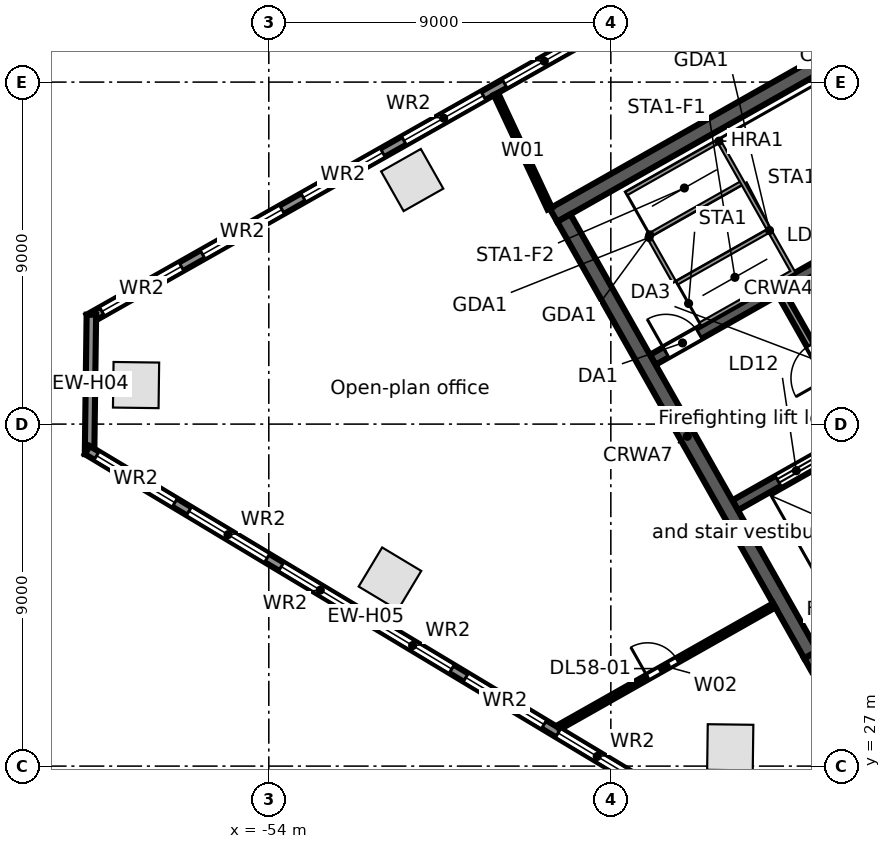
"""IFC4 building model, lengths in metres.
Left out: names, types, materials, properties, quantities, classifications, styles, units other than length and angle.
Written with IfcOpenShell. Run it as: python <this file> out.ifc"""

import sys

from ifc_helpers import new_model, si_unit, direction, frame, frame_2d, origin, origin_2d, place, context, subcontext, project, spatial, rectangle, extrude, element, fill, save


model = new_model("IFC4")
c1 = context("Model", 3, precision=1e-05, world=origin(), true_north=direction((0.0, 1.0)))
c2 = subcontext(c1, "Body", "Model", "MODEL_VIEW")
j1 = project(units=[si_unit("LENGTHUNIT", "METRE"), si_unit("PLANEANGLEUNIT", "RADIAN")], contexts=[c1])
p1 = place(None, origin())
s1 = spatial("IfcSite", under=j1, at=p1, CompositionType="ELEMENT")
p2 = place(p1, origin())
s2 = spatial("IfcBuilding", under=s1, at=p2, CompositionType="ELEMENT")
p3 = place(p2, frame((0.0, 0.0, 262.7)))
s3 = spatial("IfcBuildingStorey", under=s2, at=p3, CompositionType="ELEMENT", Elevation=262.7)
for number, where, z_axis, x_axis in (
    (1, (-50.226, 42.423, 0.0), (0.0, 0.0, 1.0), (-0.87, -0.492, 0.0)),
    (2, (-57.493, 37.027, 0.0), (0.0, 0.0, 1.0), (-0.013, -1.0, 0.0)),
    (3, (-50.812, 31.931, 0.0), (0.0, 0.0, 1.0), (0.857, -0.515, 0.0)),
    (4, (-41.858, 27.495, 0.0), (0.0, 0.0, 1.0), (1.0, -0.013, 0.0)),
):
    element("IfcColumn", number, at=place(p3, frame(where, z_axis=z_axis, x_axis=x_axis)), inside=s3, PredefinedType="COLUMN", context=c2, shape_type="SweptSolid", body=[
        extrude(rectangle(XDim=1.2, YDim=1.2, at=origin_2d()), origin(), (0.0, 0.0, 1.0), 3.8),
    ])
p4 = place(p3, frame((-58.732, 38.771, 0.0), z_axis=(0.0, 0.0, 1.0), x_axis=(0.870355615581, 0.492423702137, 0.0)))
e5 = element("IfcWall", 5, at=p4, inside=s3, PredefinedType="STANDARD", context=c2, shape_type="SweptSolid", body=[
    extrude(rectangle(XDim=64.052, YDim=0.25, at=frame_2d((32.026, 0.0))), origin(), (0.0, 0.0, 1.0), 3.52),
])
p5 = place(p4, frame((61.259, 0.0, 0.8)))
e6 = element("IfcOpeningElement", 6, at=p5, cuts=e5, PredefinedType="OPENING", context=c2, shape_type="SweptSolid", body=[
    extrude(rectangle(XDim=2.4, YDim=2.2, at=frame_2d((1.2, 1.1))), frame((0.0, 0.135, 0.0), z_axis=(0.0, -1.0, 0.0), x_axis=(1.0, 0.0, 0.0)), (0.0, 0.0, 1.0), 0.27),
])
p6 = place(p4, frame((58.216, 0.0, 0.8)))
e7 = element("IfcOpeningElement", 7, at=p6, cuts=e5, PredefinedType="OPENING", context=c2, shape_type="SweptSolid", body=[
    extrude(rectangle(XDim=2.4, YDim=2.2, at=frame_2d((1.2, 1.1))), frame((0.0, 0.135, 0.0), z_axis=(0.0, -1.0, 0.0), x_axis=(1.0, 0.0, 0.0)), (0.0, 0.0, 1.0), 0.27),
])
p7 = place(p4, frame((55.173, 0.0, 0.8)))
e8 = element("IfcOpeningElement", 8, at=p7, cuts=e5, PredefinedType="OPENING", context=c2, shape_type="SweptSolid", body=[
    extrude(rectangle(XDim=2.4, YDim=2.2, at=frame_2d((1.2, 1.1))), frame((0.0, 0.135, 0.0), z_axis=(0.0, -1.0, 0.0), x_axis=(1.0, 0.0, 0.0)), (0.0, 0.0, 1.0), 0.27),
])
p8 = place(p4, frame((52.129, 0.0, 0.8)))
e9 = element("IfcOpeningElement", 9, at=p8, cuts=e5, PredefinedType="OPENING", context=c2, shape_type="SweptSolid", body=[
    extrude(rectangle(XDim=2.4, YDim=2.2, at=frame_2d((1.2, 1.1))), frame((0.0, 0.135, 0.0), z_axis=(0.0, -1.0, 0.0), x_axis=(1.0, 0.0, 0.0)), (0.0, 0.0, 1.0), 0.27),
])
p9 = place(p4, frame((49.086, 0.0, 0.8)))
e10 = element("IfcOpeningElement", 10, at=p9, cuts=e5, PredefinedType="OPENING", context=c2, shape_type="SweptSolid", body=[
    extrude(rectangle(XDim=2.4, YDim=2.2, at=frame_2d((1.2, 1.1))), frame((0.0, 0.135, 0.0), z_axis=(0.0, -1.0, 0.0), x_axis=(1.0, 0.0, 0.0)), (0.0, 0.0, 1.0), 0.27),
])
p10 = place(p4, frame((46.043, 0.0, 0.8)))
e11 = element("IfcOpeningElement", 11, at=p10, cuts=e5, PredefinedType="OPENING", context=c2, shape_type="SweptSolid", body=[
    extrude(rectangle(XDim=2.4, YDim=2.2, at=frame_2d((1.2, 1.1))), frame((0.0, 0.135, 0.0), z_axis=(0.0, -1.0, 0.0), x_axis=(1.0, 0.0, 0.0)), (0.0, 0.0, 1.0), 0.27),
])
p11 = place(p4, frame((43.0, 0.0, 0.8)))
e12 = element("IfcOpeningElement", 12, at=p11, cuts=e5, PredefinedType="OPENING", context=c2, shape_type="SweptSolid", body=[
    extrude(rectangle(XDim=2.4, YDim=2.2, at=frame_2d((1.2, 1.1))), frame((0.0, 0.135, 0.0), z_axis=(0.0, -1.0, 0.0), x_axis=(1.0, 0.0, 0.0)), (0.0, 0.0, 1.0), 0.27),
])
p12 = place(p4, frame((39.956, 0.0, 0.8)))
e13 = element("IfcOpeningElement", 13, at=p12, cuts=e5, PredefinedType="OPENING", context=c2, shape_type="SweptSolid", body=[
    extrude(rectangle(XDim=2.4, YDim=2.2, at=frame_2d((1.2, 1.1))), frame((0.0, 0.135, 0.0), z_axis=(0.0, -1.0, 0.0), x_axis=(1.0, 0.0, 0.0)), (0.0, 0.0, 1.0), 0.27),
])
p13 = place(p4, frame((36.913, 0.0, 0.8)))
e14 = element("IfcOpeningElement", 14, at=p13, cuts=e5, PredefinedType="OPENING", context=c2, shape_type="SweptSolid", body=[
    extrude(rectangle(XDim=2.4, YDim=2.2, at=frame_2d((1.2, 1.1))), frame((0.0, 0.135, 0.0), z_axis=(0.0, -1.0, 0.0), x_axis=(1.0, 0.0, 0.0)), (0.0, 0.0, 1.0), 0.27),
])
p14 = place(p4, frame((33.87, 0.0, 0.8)))
e15 = element("IfcOpeningElement", 15, at=p14, cuts=e5, PredefinedType="OPENING", context=c2, shape_type="SweptSolid", body=[
    extrude(rectangle(XDim=2.4, YDim=2.2, at=frame_2d((1.2, 1.1))), frame((0.0, 0.135, 0.0), z_axis=(0.0, -1.0, 0.0), x_axis=(1.0, 0.0, 0.0)), (0.0, 0.0, 1.0), 0.27),
])
p15 = place(p4, frame((30.826, 0.0, 0.8)))
e16 = element("IfcOpeningElement", 16, at=p15, cuts=e5, PredefinedType="OPENING", context=c2, shape_type="SweptSolid", body=[
    extrude(rectangle(XDim=2.4, YDim=2.2, at=frame_2d((1.2, 1.1))), frame((0.0, 0.135, 0.0), z_axis=(0.0, -1.0, 0.0), x_axis=(1.0, 0.0, 0.0)), (0.0, 0.0, 1.0), 0.27),
])
p16 = place(p4, frame((27.783, 0.0, 0.8)))
e17 = element("IfcOpeningElement", 17, at=p16, cuts=e5, PredefinedType="OPENING", context=c2, shape_type="SweptSolid", body=[
    extrude(rectangle(XDim=2.4, YDim=2.2, at=frame_2d((1.2, 1.1))), frame((0.0, 0.135, 0.0), z_axis=(0.0, -1.0, 0.0), x_axis=(1.0, 0.0, 0.0)), (0.0, 0.0, 1.0), 0.27),
])
p17 = place(p4, frame((24.74, 0.0, 0.8)))
e18 = element("IfcOpeningElement", 18, at=p17, cuts=e5, PredefinedType="OPENING", context=c2, shape_type="SweptSolid", body=[
    extrude(rectangle(XDim=2.4, YDim=2.2, at=frame_2d((1.2, 1.1))), frame((0.0, 0.135, 0.0), z_axis=(0.0, -1.0, 0.0), x_axis=(1.0, 0.0, 0.0)), (0.0, 0.0, 1.0), 0.27),
])
p18 = place(p4, frame((21.696, 0.0, 0.8)))
e19 = element("IfcOpeningElement", 19, at=p18, cuts=e5, PredefinedType="OPENING", context=c2, shape_type="SweptSolid", body=[
    extrude(rectangle(XDim=2.4, YDim=2.2, at=frame_2d((1.2, 1.1))), frame((0.0, 0.135, 0.0), z_axis=(0.0, -1.0, 0.0), x_axis=(1.0, 0.0, 0.0)), (0.0, 0.0, 1.0), 0.27),
])
p19 = place(p4, frame((18.653, 0.0, 0.8)))
e20 = element("IfcOpeningElement", 20, at=p19, cuts=e5, PredefinedType="OPENING", context=c2, shape_type="SweptSolid", body=[
    extrude(rectangle(XDim=2.4, YDim=2.2, at=frame_2d((1.2, 1.1))), frame((0.0, 0.135, 0.0), z_axis=(0.0, -1.0, 0.0), x_axis=(1.0, 0.0, 0.0)), (0.0, 0.0, 1.0), 0.27),
])
p20 = place(p4, frame((15.61, 0.0, 0.8)))
e21 = element("IfcOpeningElement", 21, at=p20, cuts=e5, PredefinedType="OPENING", context=c2, shape_type="SweptSolid", body=[
    extrude(rectangle(XDim=2.4, YDim=2.2, at=frame_2d((1.2, 1.1))), frame((0.0, 0.135, 0.0), z_axis=(0.0, -1.0, 0.0), x_axis=(1.0, 0.0, 0.0)), (0.0, 0.0, 1.0), 0.27),
])
p21 = place(p4, frame((12.567, 0.0, 0.8)))
e22 = element("IfcOpeningElement", 22, at=p21, cuts=e5, PredefinedType="OPENING", context=c2, shape_type="SweptSolid", body=[
    extrude(rectangle(XDim=2.4, YDim=2.2, at=frame_2d((1.2, 1.1))), frame((0.0, 0.135, 0.0), z_axis=(0.0, -1.0, 0.0), x_axis=(1.0, 0.0, 0.0)), (0.0, 0.0, 1.0), 0.27),
])
p22 = place(p4, frame((9.523, 0.0, 0.8)))
e23 = element("IfcOpeningElement", 23, at=p22, cuts=e5, PredefinedType="OPENING", context=c2, shape_type="SweptSolid", body=[
    extrude(rectangle(XDim=2.4, YDim=2.2, at=frame_2d((1.2, 1.1))), frame((0.0, 0.135, 0.0), z_axis=(0.0, -1.0, 0.0), x_axis=(1.0, 0.0, 0.0)), (0.0, 0.0, 1.0), 0.27),
])
p23 = place(p4, frame((6.48, 0.0, 0.8)))
e24 = element("IfcOpeningElement", 24, at=p23, cuts=e5, PredefinedType="OPENING", context=c2, shape_type="SweptSolid", body=[
    extrude(rectangle(XDim=2.4, YDim=2.2, at=frame_2d((1.2, 1.1))), frame((0.0, 0.135, 0.0), z_axis=(0.0, -1.0, 0.0), x_axis=(1.0, 0.0, 0.0)), (0.0, 0.0, 1.0), 0.27),
])
p24 = place(p4, frame((3.437, 0.0, 0.8)))
e25 = element("IfcOpeningElement", 25, at=p24, cuts=e5, PredefinedType="OPENING", context=c2, shape_type="SweptSolid", body=[
    extrude(rectangle(XDim=2.4, YDim=2.2, at=frame_2d((1.2, 1.1))), frame((0.0, 0.135, 0.0), z_axis=(0.0, -1.0, 0.0), x_axis=(1.0, 0.0, 0.0)), (0.0, 0.0, 1.0), 0.27),
])
p25 = place(p4, frame((0.393, 0.0, 0.8)))
e26 = element("IfcOpeningElement", 26, at=p25, cuts=e5, PredefinedType="OPENING", context=c2, shape_type="SweptSolid", body=[
    extrude(rectangle(XDim=2.4, YDim=2.2, at=frame_2d((1.2, 1.1))), frame((0.0, 0.135, 0.0), z_axis=(0.0, -1.0, 0.0), x_axis=(1.0, 0.0, 0.0)), (0.0, 0.0, 1.0), 0.27),
])
p26 = place(p3, frame((-58.717, 35.208, 0.0), z_axis=(0.0, 0.0, 1.0), x_axis=(0.01310512158, 0.999914124207, 0.0)))
e27 = element("IfcWall", 27, at=p26, inside=s3, PredefinedType="STANDARD", context=c2, shape_type="SweptSolid", body=[
    extrude(rectangle(XDim=3.67, YDim=0.25, at=frame_2d((1.835, 0.0))), origin(), (0.0, 0.0, 1.0), 3.52),
])
p27 = place(p3, frame((-44.115, 26.507, 0.0), z_axis=(0.0, 0.0, 1.0), x_axis=(-0.857166583633, 0.515039268311, 0.0)))
e28 = element("IfcWall", 28, at=p27, inside=s3, PredefinedType="STANDARD", context=c2, shape_type="SweptSolid", body=[
    extrude(rectangle(XDim=17.106, YDim=0.25, at=frame_2d((8.553, 0.0))), origin(), (0.0, 0.0, 1.0), 3.52),
])
p28 = place(p27, frame((14.417, 0.0, 0.8)))
e29 = element("IfcOpeningElement", 29, at=p28, cuts=e28, PredefinedType="OPENING", context=c2, shape_type="SweptSolid", body=[
    extrude(rectangle(XDim=2.4, YDim=2.2, at=frame_2d((1.2, 1.1))), frame((0.0, 0.135, 0.0), z_axis=(0.0, -1.0, 0.0), x_axis=(1.0, 0.0, 0.0)), (0.0, 0.0, 1.0), 0.27),
])
p29 = place(p27, frame((11.584, 0.0, 0.8)))
e30 = element("IfcOpeningElement", 30, at=p29, cuts=e28, PredefinedType="OPENING", context=c2, shape_type="SweptSolid", body=[
    extrude(rectangle(XDim=2.4, YDim=2.2, at=frame_2d((1.2, 1.1))), frame((0.0, 0.135, 0.0), z_axis=(0.0, -1.0, 0.0), x_axis=(1.0, 0.0, 0.0)), (0.0, 0.0, 1.0), 0.27),
])
p30 = place(p27, frame((8.75, 0.0, 0.8)))
e31 = element("IfcOpeningElement", 31, at=p30, cuts=e28, PredefinedType="OPENING", context=c2, shape_type="SweptSolid", body=[
    extrude(rectangle(XDim=2.4, YDim=2.2, at=frame_2d((1.2, 1.1))), frame((0.0, 0.135, 0.0), z_axis=(0.0, -1.0, 0.0), x_axis=(1.0, 0.0, 0.0)), (0.0, 0.0, 1.0), 0.27),
])
p31 = place(p27, frame((5.917, 0.0, 0.8)))
e32 = element("IfcOpeningElement", 32, at=p31, cuts=e28, PredefinedType="OPENING", context=c2, shape_type="SweptSolid", body=[
    extrude(rectangle(XDim=2.4, YDim=2.2, at=frame_2d((1.2, 1.1))), frame((0.0, 0.135, 0.0), z_axis=(0.0, -1.0, 0.0), x_axis=(1.0, 0.0, 0.0)), (0.0, 0.0, 1.0), 0.27),
])
p32 = place(p27, frame((3.084, 0.0, 0.8)))
e33 = element("IfcOpeningElement", 33, at=p32, cuts=e28, PredefinedType="OPENING", context=c2, shape_type="SweptSolid", body=[
    extrude(rectangle(XDim=2.4, YDim=2.2, at=frame_2d((1.2, 1.1))), frame((0.0, 0.135, 0.0), z_axis=(0.0, -1.0, 0.0), x_axis=(1.0, 0.0, 0.0)), (0.0, 0.0, 1.0), 0.27),
])
p33 = place(p27, frame((0.25, 0.0, 0.8)))
e34 = element("IfcOpeningElement", 34, at=p33, cuts=e28, PredefinedType="OPENING", context=c2, shape_type="SweptSolid", body=[
    extrude(rectangle(XDim=2.4, YDim=2.2, at=frame_2d((1.2, 1.1))), frame((0.0, 0.135, 0.0), z_axis=(0.0, -1.0, 0.0), x_axis=(1.0, 0.0, 0.0)), (0.0, 0.0, 1.0), 0.27),
])
p34 = place(p3, frame((-39.813, 29.662, 0.0), z_axis=(0.0, 0.0, 1.0), x_axis=(0.870350116061, 0.492433422375, 0.0)))
e35 = element("IfcWall", 35, at=p34, inside=s3, PredefinedType="SOLIDWALL", context=c2, shape_type="SweptSolid", body=[
    extrude(rectangle(XDim=17.0, YDim=0.4, at=frame_2d((8.5, 0.0))), origin(), (0.0, 0.0, 1.0), 3.52),
])
p35 = place(p34, frame((7.2, 0.0, 0.0)))
e36 = element("IfcOpeningElement", 36, at=p35, cuts=e35, PredefinedType="OPENING", context=c2, shape_type="SweptSolid", body=[
    extrude(rectangle(XDim=1.2, YDim=2.1, at=frame_2d((0.6, 1.05))), frame((0.0, 0.21, 0.0), z_axis=(0.0, -1.0, 0.0), x_axis=(1.0, 0.0, 0.0)), (0.0, 0.0, 1.0), 0.42),
])
p36 = place(p3, frame((-41.73, 33.863, 0.0), z_axis=(0.0, 0.0, 1.0), x_axis=(0.870350800578, 0.492432212525, 0.0)))
e37 = element("IfcWall", 37, at=p36, inside=s3, PredefinedType="SOLIDWALL", context=c2, shape_type="SweptSolid", body=[
    extrude(rectangle(XDim=6.2, YDim=0.3, at=frame_2d((3.1, 0.0))), origin(), (0.0, 0.0, 1.0), 3.52),
])
p37 = place(p36, frame((1.3, 0.0, 0.0)))
e38 = element("IfcOpeningElement", 38, at=p37, cuts=e37, PredefinedType="OPENING", context=c2, shape_type="SweptSolid", body=[
    extrude(rectangle(XDim=1.1, YDim=2.1, at=frame_2d((0.55, 1.05))), frame((0.0, 0.16, 0.0), z_axis=(0.0, -1.0, 0.0), x_axis=(1.0, 0.0, 0.0)), (0.0, 0.0, 1.0), 0.32),
])
p38 = place(p3, frame((-43.897, 37.692, 0.0), z_axis=(0.0, 0.0, 1.0), x_axis=(0.870356351998, 0.492422400523, 0.0)))
e39 = element("IfcWall", 39, at=p38, inside=s3, PredefinedType="SOLIDWALL", context=c2, shape_type="SweptSolid", body=[
    extrude(rectangle(XDim=7.6, YDim=0.3, at=frame_2d((3.8, 0.0))), origin(), (0.0, 0.0, 1.0), 3.52),
])
p39 = place(p38, frame((0.4, 0.0, 0.0)))
e40 = element("IfcOpeningElement", 40, at=p39, cuts=e39, PredefinedType="OPENING", context=c2, shape_type="SweptSolid", body=[
    extrude(rectangle(XDim=1.0, YDim=2.1, at=frame_2d((0.5, 1.05))), frame((0.0, 0.16, 0.0), z_axis=(0.0, -1.0, 0.0), x_axis=(1.0, 0.0, 0.0)), (0.0, 0.0, 1.0), 0.32),
])
p40 = place(p3, frame((-46.51, 41.499, 0.0), z_axis=(0.0, 0.0, 1.0), x_axis=(0.870356271124, 0.492422543467, 0.0)))
e41 = element("IfcWall", 41, at=p40, inside=s3, PredefinedType="SOLIDWALL", context=c2, shape_type="SweptSolid", body=[
    extrude(rectangle(XDim=17.0, YDim=0.4, at=frame_2d((8.5, 0.0))), origin(), (0.0, 0.0, 1.0), 3.52),
])
p41 = place(p3, frame((-46.238, 41.423, 0.0), z_axis=(0.0, 0.0, 1.0), x_axis=(0.492421663121, -0.870356769198, 0.0)))
e42 = element("IfcWall", 42, at=p41, inside=s3, PredefinedType="SOLIDWALL", context=c2, shape_type="SweptSolid", body=[
    extrude(rectangle(XDim=13.2, YDim=0.4, at=frame_2d((6.6, 0.0))), origin(), (0.0, 0.0, 1.0), 3.52),
])
p42 = place(p3, frame((-40.516, 39.433, 0.0), z_axis=(0.0, 0.0, 1.0), x_axis=(0.492453559952, -0.87033872216, 0.0)))
e43 = element("IfcWall", 43, at=p42, inside=s3, PredefinedType="PARTITIONING", context=c2, shape_type="SweptSolid", body=[
    extrude(rectangle(XDim=4.1, YDim=0.2, at=frame_2d((2.05, 0.0))), origin(), (0.0, 0.0, 1.0), 3.52),
])
p43 = place(p42, frame((1.55, 0.0, 0.0)))
e44 = element("IfcOpeningElement", 44, at=p43, cuts=e43, PredefinedType="OPENING", context=c2, shape_type="SweptSolid", body=[
    extrude(rectangle(XDim=1.0, YDim=2.1, at=frame_2d((0.5, 1.05))), frame((0.0, 0.11, 0.0), z_axis=(0.0, -1.0, 0.0), x_axis=(1.0, 0.0, 0.0)), (0.0, 0.0, 1.0), 0.22),
])
p44 = place(p3, frame((-48.022, 44.687, 0.0), z_axis=(0.0, 0.0, 1.0), x_axis=(0.424510917438, -0.905422818895, 0.0)))
e45 = element("IfcWall", 45, at=p44, inside=s3, PredefinedType="PARTITIONING", context=c2, shape_type="SweptSolid", body=[
    extrude(rectangle(XDim=3.329, YDim=0.125, at=frame_2d((1.665, 0.0))), origin(), (0.0, 0.0, 1.0), 2.888),
])
p45 = place(p3, frame((-46.381, 28.015, 0.0), z_axis=(0.0, 0.0, 1.0), x_axis=(0.870364232693, 0.492408471139, 0.0)))
e46 = element("IfcWall", 46, at=p45, inside=s3, PredefinedType="PARTITIONING", context=c2, shape_type="SweptSolid", body=[
    extrude(rectangle(XDim=6.527, YDim=0.125, at=frame_2d((3.264, 0.0))), origin(), (0.0, 0.0, 1.0), 2.8),
])
p46 = place(p45, frame((2.7, 0.0, 0.0)))
e47 = element("IfcOpeningElement", 47, at=p46, cuts=e46, PredefinedType="OPENING", context=c2, shape_type="SweptSolid", body=[
    extrude(rectangle(XDim=0.9, YDim=2.1, at=frame_2d((0.45, 1.05))), frame((0.0, 0.073, 0.0), z_axis=(0.0, -1.0, 0.0), x_axis=(1.0, 0.0, 0.0)), (0.0, 0.0, 1.0), 0.145),
])
p47 = place(p21, origin())
e48 = element("IfcWindow", 48, at=p47, inside=s3, PartitioningType="SINGLE_PANEL", PredefinedType="WINDOW", context=c2, shape_type="SweptSolid", body=[
    extrude(rectangle(XDim=2.4, YDim=2.2, at=frame_2d((1.2, 1.1))), frame((0.0, 0.03, 0.0), z_axis=(0.0, -1.0, 0.0), x_axis=(1.0, 0.0, 0.0)), (0.0, 0.0, 1.0), 0.06),
])
fill(e22, e48)
p48 = place(p22, origin())
e49 = element("IfcWindow", 49, at=p48, inside=s3, PartitioningType="SINGLE_PANEL", PredefinedType="WINDOW", context=c2, shape_type="SweptSolid", body=[
    extrude(rectangle(XDim=2.4, YDim=2.2, at=frame_2d((1.2, 1.1))), frame((0.0, 0.03, 0.0), z_axis=(0.0, -1.0, 0.0), x_axis=(1.0, 0.0, 0.0)), (0.0, 0.0, 1.0), 0.06),
])
fill(e23, e49)
p49 = place(p23, origin())
e50 = element("IfcWindow", 50, at=p49, inside=s3, PartitioningType="SINGLE_PANEL", PredefinedType="WINDOW", context=c2, shape_type="SweptSolid", body=[
    extrude(rectangle(XDim=2.4, YDim=2.2, at=frame_2d((1.2, 1.1))), frame((0.0, 0.03, 0.0), z_axis=(0.0, -1.0, 0.0), x_axis=(1.0, 0.0, 0.0)), (0.0, 0.0, 1.0), 0.06),
])
fill(e24, e50)
p50 = place(p24, origin())
e51 = element("IfcWindow", 51, at=p50, inside=s3, PartitioningType="SINGLE_PANEL", PredefinedType="WINDOW", context=c2, shape_type="SweptSolid", body=[
    extrude(rectangle(XDim=2.4, YDim=2.2, at=frame_2d((1.2, 1.1))), frame((0.0, 0.03, 0.0), z_axis=(0.0, -1.0, 0.0), x_axis=(1.0, 0.0, 0.0)), (0.0, 0.0, 1.0), 0.06),
])
fill(e25, e51)
p51 = place(p25, origin())
e52 = element("IfcWindow", 52, at=p51, inside=s3, PartitioningType="SINGLE_PANEL", PredefinedType="WINDOW", context=c2, shape_type="SweptSolid", body=[
    extrude(rectangle(XDim=2.4, YDim=2.2, at=frame_2d((1.2, 1.1))), frame((0.0, 0.03, 0.0), z_axis=(0.0, -1.0, 0.0), x_axis=(1.0, 0.0, 0.0)), (0.0, 0.0, 1.0), 0.06),
])
fill(e26, e52)
p52 = place(p28, origin())
e53 = element("IfcWindow", 53, at=p52, inside=s3, PartitioningType="SINGLE_PANEL", PredefinedType="WINDOW", context=c2, shape_type="SweptSolid", body=[
    extrude(rectangle(XDim=2.4, YDim=2.2, at=frame_2d((1.2, 1.1))), frame((0.0, 0.03, 0.0), z_axis=(0.0, -1.0, 0.0), x_axis=(1.0, 0.0, 0.0)), (0.0, 0.0, 1.0), 0.06),
])
fill(e29, e53)
p53 = place(p29, origin())
e54 = element("IfcWindow", 54, at=p53, inside=s3, PartitioningType="SINGLE_PANEL", PredefinedType="WINDOW", context=c2, shape_type="SweptSolid", body=[
    extrude(rectangle(XDim=2.4, YDim=2.2, at=frame_2d((1.2, 1.1))), frame((0.0, 0.03, 0.0), z_axis=(0.0, -1.0, 0.0), x_axis=(1.0, 0.0, 0.0)), (0.0, 0.0, 1.0), 0.06),
])
fill(e30, e54)
p54 = place(p30, origin())
e55 = element("IfcWindow", 55, at=p54, inside=s3, PartitioningType="SINGLE_PANEL", PredefinedType="WINDOW", context=c2, shape_type="SweptSolid", body=[
    extrude(rectangle(XDim=2.4, YDim=2.2, at=frame_2d((1.2, 1.1))), frame((0.0, 0.03, 0.0), z_axis=(0.0, -1.0, 0.0), x_axis=(1.0, 0.0, 0.0)), (0.0, 0.0, 1.0), 0.06),
])
fill(e31, e55)
p55 = place(p31, origin())
e56 = element("IfcWindow", 56, at=p55, inside=s3, PartitioningType="SINGLE_PANEL", PredefinedType="WINDOW", context=c2, shape_type="SweptSolid", body=[
    extrude(rectangle(XDim=2.4, YDim=2.2, at=frame_2d((1.2, 1.1))), frame((0.0, 0.03, 0.0), z_axis=(0.0, -1.0, 0.0), x_axis=(1.0, 0.0, 0.0)), (0.0, 0.0, 1.0), 0.06),
])
fill(e32, e56)
p56 = place(p32, origin())
e57 = element("IfcWindow", 57, at=p56, inside=s3, PartitioningType="SINGLE_PANEL", PredefinedType="WINDOW", context=c2, shape_type="SweptSolid", body=[
    extrude(rectangle(XDim=2.4, YDim=2.2, at=frame_2d((1.2, 1.1))), frame((0.0, 0.03, 0.0), z_axis=(0.0, -1.0, 0.0), x_axis=(1.0, 0.0, 0.0)), (0.0, 0.0, 1.0), 0.06),
])
fill(e33, e57)
p57 = place(p33, origin())
e58 = element("IfcWindow", 58, at=p57, inside=s3, PartitioningType="SINGLE_PANEL", PredefinedType="WINDOW", context=c2, shape_type="SweptSolid", body=[
    extrude(rectangle(XDim=2.4, YDim=2.2, at=frame_2d((1.2, 1.1))), frame((0.0, 0.03, 0.0), z_axis=(0.0, -1.0, 0.0), x_axis=(1.0, 0.0, 0.0)), (0.0, 0.0, 1.0), 0.06),
])
fill(e34, e58)
p58 = place(p37, origin())
e59 = element("IfcDoor", 59, at=p58, inside=s3, OperationType="DOUBLE_DOOR_SLIDING", PredefinedType="DOOR", context=c2, shape_type="SweptSolid", body=[
    extrude(rectangle(XDim=1.1, YDim=2.1, at=frame_2d((0.55, 1.05))), frame((0.0, 0.025, 0.0), z_axis=(0.0, -1.0, 0.0), x_axis=(1.0, 0.0, 0.0)), (0.0, 0.0, 1.0), 0.05),
])
fill(e38, e59)
p59 = place(p39, origin())
e60 = element("IfcDoor", 60, at=p59, inside=s3, OperationType="SINGLE_SWING_LEFT", PredefinedType="DOOR", context=c2, shape_type="SweptSolid", body=[
    extrude(rectangle(XDim=1.0, YDim=2.1, at=frame_2d((0.5, 1.05))), frame((0.0, 0.025, 0.0), z_axis=(0.0, -1.0, 0.0), x_axis=(1.0, 0.0, 0.0)), (0.0, 0.0, 1.0), 0.05),
])
fill(e40, e60)
p60 = place(p43, frame((1.0, 0.0, 0.0), z_axis=(0.0, 0.0, 1.0), x_axis=(-1.0, 0.0, 0.0)))
e61 = element("IfcDoor", 61, at=p60, inside=s3, OperationType="SINGLE_SWING_LEFT", PredefinedType="DOOR", context=c2, shape_type="SweptSolid", body=[
    extrude(rectangle(XDim=1.0, YDim=2.1, at=frame_2d((0.5, 1.05))), frame((0.0, 0.025, 0.0), z_axis=(0.0, -1.0, 0.0), x_axis=(1.0, 0.0, 0.0)), (0.0, 0.0, 1.0), 0.05),
])
fill(e44, e61)
p61 = place(p46, origin())
e62 = element("IfcDoor", 62, at=p61, inside=s3, OperationType="SINGLE_SWING_LEFT", PredefinedType="DOOR", context=c2, shape_type="SweptSolid", body=[
    extrude(rectangle(XDim=0.9, YDim=2.1, at=frame_2d((0.45, 1.05))), frame((0.0, 0.025, 0.0), z_axis=(0.0, -1.0, 0.0), x_axis=(1.0, 0.0, 0.0)), (0.0, 0.0, 1.0), 0.05),
])
fill(e47, e62)
save(model, sys.argv[1])
